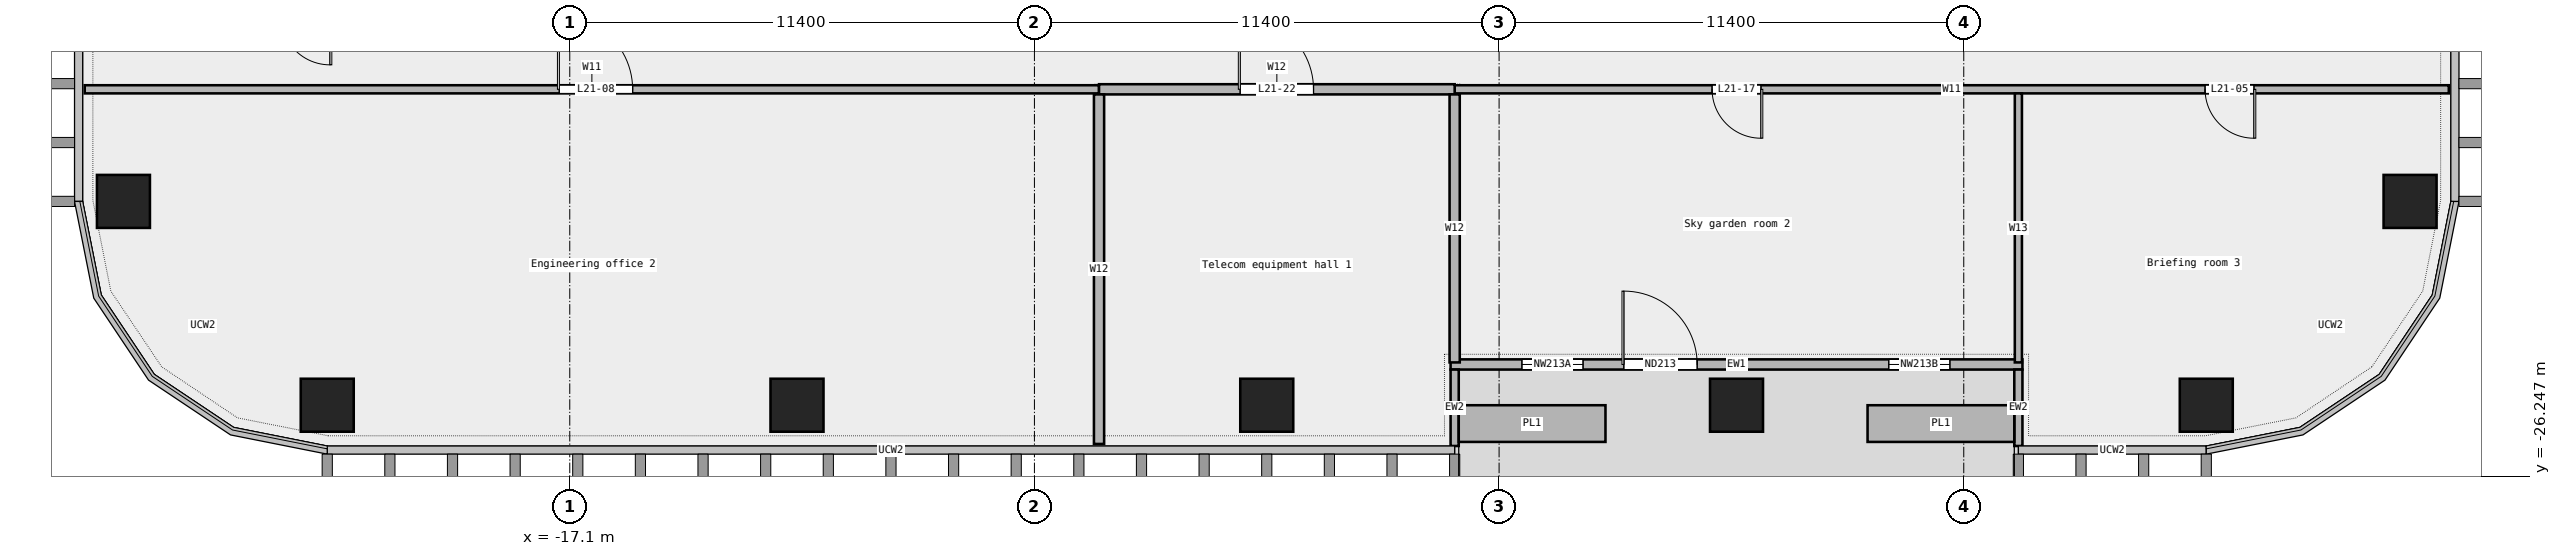
"""IFC4 building model, lengths in metres.
Left out: names, types, materials, properties, quantities, classifications, styles, units other than length and angle.
Written with IfcOpenShell. Run it as: python <this file> out.ifc"""

import sys

from ifc_helpers import new_model, si_unit, direction, frame, frame_2d, origin, origin_2d, place, context, subcontext, project, spatial, rectangle, extrude, element, fill, save


model = new_model("IFC4")
c1 = context("Model", 3, precision=1e-05, world=origin(), true_north=direction((0.0, 1.0)))
c2 = subcontext(c1, "Body", "Model", "MODEL_VIEW")
j1 = project(units=[si_unit("LENGTHUNIT", "METRE"), si_unit("PLANEANGLEUNIT", "RADIAN")], contexts=[c1])
p1 = place(None, origin())
s1 = spatial("IfcSite", under=j1, at=p1, CompositionType="ELEMENT")
p2 = place(p1, origin())
s2 = spatial("IfcBuilding", under=s1, at=p2, CompositionType="ELEMENT")
p3 = place(p2, frame((0.0, 0.0, 108.1)))
s3 = spatial("IfcBuildingStorey", under=s2, at=p3, CompositionType="ELEMENT", Elevation=108.1)
for number, where, z_axis, x_axis in (
    (1, (-23.05, -24.5, 0.0), (0.0, 0.0, 1.0), (1.0, 0.0, 0.0)),
    (2, (-11.525, -24.5, 0.0), (0.0, 0.0, 1.0), (1.0, 0.0, 0.0)),
    (3, (0.0, -24.5, 0.0), (0.0, 0.0, 1.0), (1.0, 0.0, 0.0)),
    (4, (11.525, -24.5, 0.0), (0.0, 0.0, 1.0), (1.0, 0.0, 0.0)),
    (5, (23.05, -24.5, 0.0), (0.0, 0.0, 1.0), (1.0, 0.0, 0.0)),
    (6, (28.05, -19.5, 0.0), (0.0, 0.0, 1.0), (1.0, 0.0, 0.0)),
    (7, (-28.05, -19.5, 0.0), (0.0, 0.0, 1.0), (1.0, 0.0, 0.0)),
):
    element("IfcColumn", number, at=place(p3, frame(where, z_axis=z_axis, x_axis=x_axis)), inside=s3, PredefinedType="COLUMN", context=c2, shape_type="SweptSolid", body=[
        extrude(rectangle(XDim=1.3, YDim=1.3, at=origin_2d()), origin(), (0.0, 0.0, 1.0), 4.05),
    ])
p4 = place(p3, frame((4.51, -23.5, 0.0), z_axis=(0.0, 0.0, 1.0), x_axis=(1.0, 0.0, 0.0)))
e8 = element("IfcWall", 8, at=p4, inside=s3, PredefinedType="STANDARD", context=c2, shape_type="SweptSolid", body=[
    extrude(rectangle(XDim=14.03, YDim=0.25, at=frame_2d((7.015, 0.0))), origin(), (0.0, 0.0, 1.0), 4.05),
])
p5 = place(p4, frame((1.75, 0.0, 0.45)))
e9 = element("IfcOpeningElement", 9, at=p5, cuts=e8, PredefinedType="OPENING", context=c2, shape_type="SweptSolid", body=[
    extrude(rectangle(XDim=1.5, YDim=3.0, at=frame_2d((0.75, 1.5))), frame((0.0, 0.137, 0.0), z_axis=(0.0, -1.0, 0.0), x_axis=(1.0, 0.0, 0.0)), (0.0, 0.0, 1.0), 0.274),
])
p6 = place(p4, frame((4.25, 0.0, 0.0)))
e10 = element("IfcOpeningElement", 10, at=p6, cuts=e8, PredefinedType="OPENING", context=c2, shape_type="SweptSolid", body=[
    extrude(rectangle(XDim=1.8, YDim=2.4, at=frame_2d((0.9, 1.2))), frame((0.0, 0.137, 0.0), z_axis=(0.0, -1.0, 0.0), x_axis=(1.0, 0.0, 0.0)), (0.0, 0.0, 1.0), 0.274),
])
p7 = place(p4, frame((10.75, 0.0, 0.45)))
e11 = element("IfcOpeningElement", 11, at=p7, cuts=e8, PredefinedType="OPENING", context=c2, shape_type="SweptSolid", body=[
    extrude(rectangle(XDim=1.5, YDim=3.0, at=frame_2d((0.75, 1.5))), frame((0.0, 0.137, 0.0), z_axis=(0.0, -1.0, 0.0), x_axis=(1.0, 0.0, 0.0)), (0.0, 0.0, 1.0), 0.274),
])
for number, where, z_axis, x_axis in (
    (12, (4.61, -25.5, 0.0), (0.0, 0.0, 1.0), (0.0, 1.0, 0.0)),
    (13, (18.44, -25.5, 0.0), (0.0, 0.0, 1.0), (0.0, 1.0, 0.0)),
):
    element("IfcWall", number, at=place(p3, frame(where, z_axis=z_axis, x_axis=x_axis)), inside=s3, PredefinedType="STANDARD", context=c2, shape_type="SweptSolid", body=[
        extrude(rectangle(XDim=1.875, YDim=0.2, at=frame_2d((0.938, 0.0))), origin(), (0.0, 0.0, 1.0), 4.05),
    ])
for number, where, z_axis, x_axis in (
    (14, (4.71, -24.95, 0.0), (0.0, 0.0, 1.0), (1.0, 0.0, 0.0)),
    (15, (14.74, -24.95, 0.0), (0.0, 0.0, 1.0), (1.0, 0.0, 0.0)),
):
    element("IfcWall", number, at=place(p3, frame(where, z_axis=z_axis, x_axis=x_axis)), inside=s3, PredefinedType="STANDARD", context=c2, shape_type="SweptSolid", body=[
        extrude(rectangle(XDim=3.6, YDim=0.9, at=frame_2d((1.8, 0.0))), origin(), (0.0, 0.0, 1.0), 0.7),
    ])
p8 = place(p3, frame((-29.0, -16.75, 0.0), z_axis=(0.0, 0.0, 1.0), x_axis=(1.0, 0.0, 0.0)))
e16 = element("IfcWall", 16, at=p8, inside=s3, PredefinedType="PARTITIONING", context=c2, shape_type="SweptSolid", body=[
    extrude(rectangle(XDim=24.885, YDim=0.2, at=frame_2d((12.442, 0.0))), origin(), (0.0, 0.0, 1.0), 4.05),
])
p9 = place(p8, frame((11.643, 0.0, 0.0)))
e17 = element("IfcOpeningElement", 17, at=p9, cuts=e16, PredefinedType="OPENING", context=c2, shape_type="SweptSolid", body=[
    extrude(rectangle(XDim=1.8, YDim=2.1, at=frame_2d((0.9, 1.05))), frame((0.0, 0.112, 0.0), z_axis=(0.0, -1.0, 0.0), x_axis=(1.0, 0.0, 0.0)), (0.0, 0.0, 1.0), 0.224),
])
p10 = place(p3, frame((4.61, -16.75, 0.0), z_axis=(0.0, 0.0, 1.0), x_axis=(1.0, 0.0, 0.0)))
e18 = element("IfcWall", 18, at=p10, inside=s3, PredefinedType="PARTITIONING", context=c2, shape_type="SweptSolid", body=[
    extrude(rectangle(XDim=24.39, YDim=0.2, at=frame_2d((12.195, 0.0))), origin(), (0.0, 0.0, 1.0), 4.05),
])
p11 = place(p10, frame((18.41, 0.0, 0.0)))
e19 = element("IfcOpeningElement", 19, at=p11, cuts=e18, PredefinedType="OPENING", context=c2, shape_type="SweptSolid", body=[
    extrude(rectangle(XDim=1.2, YDim=2.1, at=frame_2d((0.6, 1.05))), frame((0.0, 0.112, 0.0), z_axis=(0.0, -1.0, 0.0), x_axis=(1.0, 0.0, 0.0)), (0.0, 0.0, 1.0), 0.224),
])
p12 = place(p10, frame((6.315, 0.0, 0.0)))
e20 = element("IfcOpeningElement", 20, at=p12, cuts=e18, PredefinedType="OPENING", context=c2, shape_type="SweptSolid", body=[
    extrude(rectangle(XDim=1.2, YDim=2.1, at=frame_2d((0.6, 1.05))), frame((0.0, 0.112, 0.0), z_axis=(0.0, -1.0, 0.0), x_axis=(1.0, 0.0, 0.0)), (0.0, 0.0, 1.0), 0.224),
])
p13 = place(p3, frame((-4.115, -16.75, 0.0), z_axis=(0.0, 0.0, 1.0), x_axis=(1.0, 0.0, 0.0)))
e21 = element("IfcWall", 21, at=p13, inside=s3, PredefinedType="PARTITIONING", context=c2, shape_type="SweptSolid", body=[
    extrude(rectangle(XDim=8.725, YDim=0.25, at=frame_2d((4.363, 0.0))), origin(), (0.0, 0.0, 1.0), 4.05),
])
p14 = place(p13, frame((3.462, 0.0, 0.0)))
e22 = element("IfcOpeningElement", 22, at=p14, cuts=e21, PredefinedType="OPENING", context=c2, shape_type="SweptSolid", body=[
    extrude(rectangle(XDim=1.8, YDim=2.1, at=frame_2d((0.9, 1.05))), frame((0.0, 0.137, 0.0), z_axis=(0.0, -1.0, 0.0), x_axis=(1.0, 0.0, 0.0)), (0.0, 0.0, 1.0), 0.274),
])
p15 = place(p3, frame((-4.115, -25.45, 0.0), z_axis=(0.0, 0.0, 1.0), x_axis=(0.0, 1.0, 0.0)))
e23 = element("IfcWall", 23, at=p15, inside=s3, PredefinedType="PARTITIONING", context=c2, shape_type="SweptSolid", body=[
    extrude(rectangle(XDim=8.575, YDim=0.25, at=frame_2d((4.288, 0.0))), origin(), (0.0, 0.0, 1.0), 4.05),
])
p16 = place(p3, frame((4.61, -23.45, 0.0), z_axis=(0.0, 0.0, 1.0), x_axis=(0.0, 1.0, 0.0)))
e24 = element("IfcWall", 24, at=p16, inside=s3, PredefinedType="PARTITIONING", context=c2, shape_type="SweptSolid", body=[
    extrude(rectangle(XDim=6.575, YDim=0.25, at=frame_2d((3.288, 0.0))), origin(), (0.0, 0.0, 1.0), 4.05),
])
p17 = place(p3, frame((18.44, -23.45, 0.0), z_axis=(0.0, 0.0, 1.0), x_axis=(0.0, 1.0, 0.0)))
e25 = element("IfcWall", 25, at=p17, inside=s3, PredefinedType="PARTITIONING", context=c2, shape_type="SweptSolid", body=[
    extrude(rectangle(XDim=6.6, YDim=0.175, at=frame_2d((3.3, 0.0))), origin(), (0.0, 0.0, 1.0), 4.05),
])
p18 = place(p5, origin())
e26 = element("IfcWindow", 26, at=p18, inside=s3, PartitioningType="SINGLE_PANEL", PredefinedType="WINDOW", context=c2, shape_type="SweptSolid", body=[
    extrude(rectangle(XDim=1.5, YDim=3.0, at=frame_2d((0.75, 1.5))), frame((0.0, 0.03, 0.0), z_axis=(0.0, -1.0, 0.0), x_axis=(1.0, 0.0, 0.0)), (0.0, 0.0, 1.0), 0.06),
])
fill(e9, e26)
p19 = place(p6, origin())
e27 = element("IfcDoor", 27, at=p19, inside=s3, OperationType="DOUBLE_DOOR_SINGLE_SWING", PredefinedType="DOOR", context=c2, shape_type="SweptSolid", body=[
    extrude(rectangle(XDim=1.8, YDim=2.4, at=frame_2d((0.9, 1.2))), frame((0.0, 0.025, 0.0), z_axis=(0.0, -1.0, 0.0), x_axis=(1.0, 0.0, 0.0)), (0.0, 0.0, 1.0), 0.05),
])
fill(e10, e27)
p20 = place(p7, origin())
e28 = element("IfcWindow", 28, at=p20, inside=s3, PartitioningType="SINGLE_PANEL", PredefinedType="WINDOW", context=c2, shape_type="SweptSolid", body=[
    extrude(rectangle(XDim=1.5, YDim=3.0, at=frame_2d((0.75, 1.5))), frame((0.0, 0.03, 0.0), z_axis=(0.0, -1.0, 0.0), x_axis=(1.0, 0.0, 0.0)), (0.0, 0.0, 1.0), 0.06),
])
fill(e11, e28)
p21 = place(p11, origin())
e29 = element("IfcDoor", 29, at=p21, inside=s3, OperationType="SINGLE_SWING_LEFT", PredefinedType="DOOR", context=c2, shape_type="SweptSolid", body=[
    extrude(rectangle(XDim=1.2, YDim=2.1, at=frame_2d((0.6, 1.05))), frame((0.0, 0.025, 0.0), z_axis=(0.0, -1.0, 0.0), x_axis=(1.0, 0.0, 0.0)), (0.0, 0.0, 1.0), 0.05),
])
fill(e19, e29)
p22 = place(p9, origin())
e30 = element("IfcDoor", 30, at=p22, inside=s3, OperationType="DOUBLE_DOOR_SINGLE_SWING", PredefinedType="DOOR", context=c2, shape_type="SweptSolid", body=[
    extrude(rectangle(XDim=1.8, YDim=2.1, at=frame_2d((0.9, 1.05))), frame((0.0, 0.025, 0.0), z_axis=(0.0, -1.0, 0.0), x_axis=(1.0, 0.0, 0.0)), (0.0, 0.0, 1.0), 0.05),
])
fill(e17, e30)
p23 = place(p12, origin())
e31 = element("IfcDoor", 31, at=p23, inside=s3, OperationType="SINGLE_SWING_LEFT", PredefinedType="DOOR", context=c2, shape_type="SweptSolid", body=[
    extrude(rectangle(XDim=1.2, YDim=2.1, at=frame_2d((0.6, 1.05))), frame((0.0, 0.025, 0.0), z_axis=(0.0, -1.0, 0.0), x_axis=(1.0, 0.0, 0.0)), (0.0, 0.0, 1.0), 0.05),
])
fill(e20, e31)
p24 = place(p14, origin())
e32 = element("IfcDoor", 32, at=p24, inside=s3, OperationType="DOUBLE_DOOR_SINGLE_SWING", PredefinedType="DOOR", context=c2, shape_type="SweptSolid", body=[
    extrude(rectangle(XDim=1.8, YDim=2.1, at=frame_2d((0.9, 1.05))), frame((0.0, 0.025, 0.0), z_axis=(0.0, -1.0, 0.0), x_axis=(1.0, 0.0, 0.0)), (0.0, 0.0, 1.0), 0.05),
])
fill(e22, e32)
save(model, sys.argv[1])
